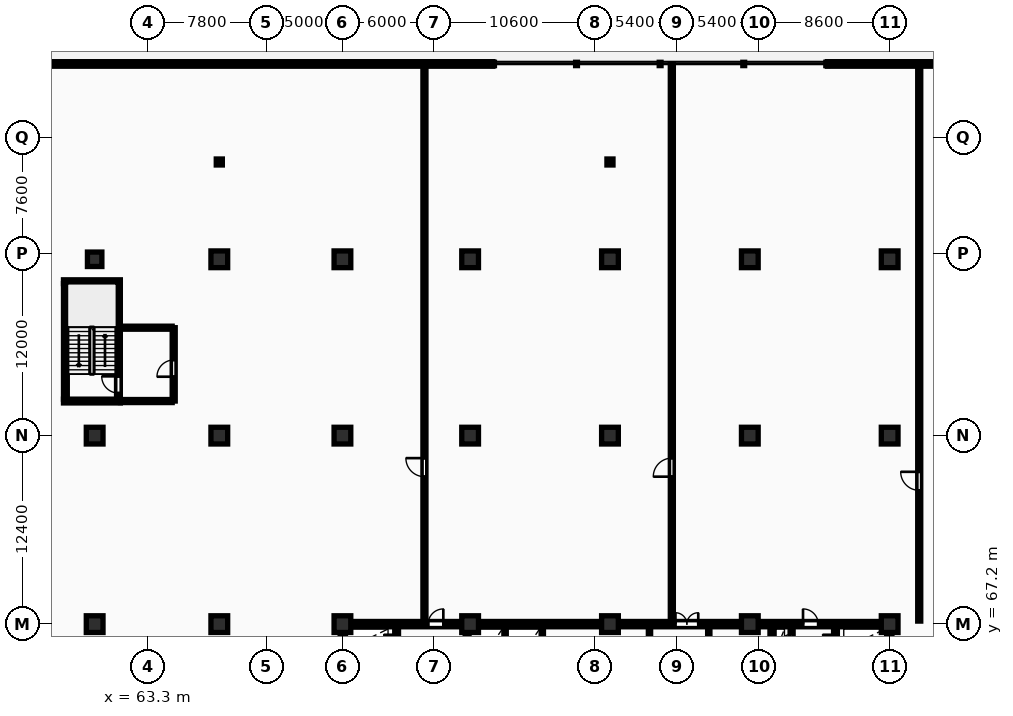
"""IFC4 building model, lengths in metres.
Left out: names, types, materials, properties, quantities, classifications, styles, units other than length and angle.
Written with IfcOpenShell. Run it as: python <this file> out.ifc"""

import sys

from ifc_helpers import new_model, si_unit, direction, frame, frame_2d, origin, origin_2d, place, context, subcontext, project, spatial, rectangle, circle, i_section, extrude, element, fill, save


model = new_model("IFC4")
c1 = context("Model", 3, precision=1e-05, world=origin(), true_north=direction((0.0, 1.0)))
c2 = subcontext(c1, "Body", "Model", "MODEL_VIEW")
j1 = project(units=[si_unit("LENGTHUNIT", "METRE"), si_unit("PLANEANGLEUNIT", "RADIAN")], contexts=[c1])
p1 = place(None, origin())
s1 = spatial("IfcSite", under=j1, at=p1, CompositionType="ELEMENT")
p2 = place(p1, origin())
s2 = spatial("IfcBuilding", under=s1, at=p2, CompositionType="ELEMENT")
p3 = place(p2, frame((0.0, 0.0, 10.0)))
s3 = spatial("IfcBuildingStorey", under=s2, at=p3, CompositionType="ELEMENT", Elevation=10.0)
for number, where, z_axis, x_axis in (
    (1, (59.8, 67.2, 0.0), (0.0, 0.0, 1.0), (1.0, 0.0, 0.0)),
    (2, (59.8, 79.6, 0.0), (0.0, 0.0, 1.0), (1.0, 0.0, 0.0)),
):
    element("IfcColumn", number, at=place(p3, frame(where, z_axis=z_axis, x_axis=x_axis)), inside=s3, PredefinedType="COLUMN", context=c2, shape_type="SweptSolid", body=[
        extrude(rectangle(XDim=1.1, YDim=1.1, at=origin_2d()), origin(), (0.0, 0.0, 1.0), 4.5),
    ])
p4 = place(p3, frame((59.8, 91.2, 0.0), z_axis=(0.0, 0.0, 1.0), x_axis=(1.0, 0.0, 0.0)))
e3 = element("IfcColumn", 3, at=p4, inside=s3, PredefinedType="COLUMN", context=c2, shape_type="SweptSolid", body=[
    extrude(circle(Radius=0.475, at=origin_2d()), origin(), (0.0, 0.0, 1.0), 4.5),
])
for number, where, z_axis, x_axis in (
    (4, (68.0, 67.2, 0.0), (0.0, 0.0, 1.0), (1.0, 0.0, 0.0)),
    (5, (68.0, 79.6, 0.0), (0.0, 0.0, 1.0), (1.0, 0.0, 0.0)),
    (6, (68.0, 91.2, 0.0), (0.0, 0.0, 1.0), (1.0, 0.0, 0.0)),
    (7, (76.1, 67.2, 0.0), (0.0, 0.0, 1.0), (1.0, 0.0, 0.0)),
    (8, (76.1, 79.6, 0.0), (0.0, 0.0, 1.0), (1.0, 0.0, 0.0)),
    (9, (76.1, 91.2, 0.0), (0.0, 0.0, 1.0), (1.0, 0.0, 0.0)),
    (10, (84.5, 67.2, 0.0), (0.0, 0.0, 1.0), (1.0, 0.0, 0.0)),
    (11, (84.5, 79.6, 0.0), (0.0, 0.0, 1.0), (1.0, 0.0, 0.0)),
    (12, (84.5, 91.2, 0.0), (0.0, 0.0, 1.0), (1.0, 0.0, 0.0)),
    (13, (93.7, 67.2, 0.0), (0.0, 0.0, 1.0), (1.0, 0.0, 0.0)),
    (14, (93.7, 79.6, 0.0), (0.0, 0.0, 1.0), (1.0, 0.0, 0.0)),
    (15, (93.7, 91.2, 0.0), (0.0, 0.0, 1.0), (1.0, 0.0, 0.0)),
    (16, (102.9, 67.2, 0.0), (0.0, 0.0, 1.0), (1.0, 0.0, 0.0)),
    (17, (102.9, 79.6, 0.0), (0.0, 0.0, 1.0), (1.0, 0.0, 0.0)),
    (18, (102.9, 91.2, 0.0), (0.0, 0.0, 1.0), (1.0, 0.0, 0.0)),
    (19, (112.1, 67.2, 0.0), (0.0, 0.0, 1.0), (1.0, 0.0, 0.0)),
    (20, (112.1, 79.6, 0.0), (0.0, 0.0, 1.0), (1.0, 0.0, 0.0)),
    (21, (112.1, 91.2, 0.0), (0.0, 0.0, 1.0), (1.0, 0.0, 0.0)),
):
    element("IfcColumn", number, at=place(p3, frame(where, z_axis=z_axis, x_axis=x_axis)), inside=s3, PredefinedType="COLUMN", context=c2, shape_type="SweptSolid", body=[
        extrude(rectangle(XDim=1.1, YDim=1.1, at=origin_2d()), origin(), (0.0, 0.0, 1.0), 4.5),
    ])
for number, where, z_axis, x_axis in (
    (22, (68.0, 97.6, 0.0), (0.0, 0.0, 1.0), (1.0, 0.0, 0.0)),
    (23, (93.7, 97.6, 0.0), (0.0, 0.0, 1.0), (1.0, 0.0, 0.0)),
):
    element("IfcColumn", number, at=place(p3, frame(where, z_axis=z_axis, x_axis=x_axis)), inside=s3, PredefinedType="COLUMN", context=c2, shape_type="SweptSolid", body=[
        extrude(i_section(OverallWidth=0.399, OverallDepth=0.394, WebThickness=0.023, FlangeThickness=0.037, FilletRadius=0.015, at=origin_2d()), origin(), (0.0, 0.0, 1.0), 4.5),
    ])
p5 = place(p3, frame((146.8, 104.05, 0.0), z_axis=(0.0, 0.0, 1.0), x_axis=(-1.0, 0.0, 0.0)))
e24 = element("IfcWall", 24, at=p5, inside=s3, PredefinedType="STANDARD", context=c2, shape_type="SweptSolid", body=[
    extrude(rectangle(XDim=38.8, YDim=0.3, at=frame_2d((19.4, 0.0))), origin(), (0.0, 0.0, 1.0), 4.2),
])
p6 = place(p5, frame((10.0, 0.0, 0.0)))
e25 = element("IfcOpeningElement", 25, at=p6, cuts=e24, PredefinedType="OPENING", context=c2, shape_type="SweptSolid", body=[
    extrude(rectangle(XDim=1.6, YDim=2.2, at=frame_2d((0.8, 1.1))), frame((0.0, 0.16, 0.0), z_axis=(0.0, -1.0, 0.0), x_axis=(1.0, 0.0, 0.0)), (0.0, 0.0, 1.0), 0.32),
])
p7 = place(p3, frame((86.0, 104.05, 0.0), z_axis=(0.0, 0.0, 1.0), x_axis=(-1.0, 0.0, 0.0)))
e26 = element("IfcWall", 26, at=p7, inside=s3, PredefinedType="STANDARD", context=c2, shape_type="SweptSolid", body=[
    extrude(rectangle(XDim=36.8, YDim=0.3, at=frame_2d((18.4, 0.0))), origin(), (0.0, 0.0, 1.0), 4.2),
])
for number, where, z_axis, x_axis in (
    (27, (76.125, 55.375, 0.0), (0.0, 0.0, 1.0), (0.0, 1.0, 0.0)),
    (28, (112.075, 55.375, 0.0), (0.0, 0.0, 1.0), (0.0, 1.0, 0.0)),
):
    element("IfcWall", number, at=place(p3, frame(where, z_axis=z_axis, x_axis=x_axis)), inside=s3, PredefinedType="SHEAR", context=c2, shape_type="SweptSolid", body=[
        extrude(rectangle(XDim=11.65, YDim=0.35, at=frame_2d((5.825, 0.0))), origin(), (0.0, 0.0, 1.0), 4.5),
    ])
p8 = place(p3, frame((75.95, 67.2, 0.0), z_axis=(0.0, 0.0, 1.0), x_axis=(1.0, 0.0, 0.0)))
e29 = element("IfcWall", 29, at=p8, inside=s3, PredefinedType="SHEAR", context=c2, shape_type="SweptSolid", body=[
    extrude(rectangle(XDim=36.3, YDim=0.35, at=frame_2d((18.15, 0.0))), origin(), (0.0, 0.0, 1.0), 4.5),
])
p9 = place(p8, frame((5.788, 0.0, 0.0)))
e30 = element("IfcOpeningElement", 30, at=p9, cuts=e29, PredefinedType="OPENING", context=c2, shape_type="SweptSolid", body=[
    extrude(rectangle(XDim=1.0, YDim=2.15, at=frame_2d((0.5, 1.075))), frame((0.0, 0.185, 0.0), z_axis=(0.0, -1.0, 0.0), x_axis=(1.0, 0.0, 0.0)), (0.0, 0.0, 1.0), 0.37),
])
p10 = place(p8, frame((22.058, 0.0, 0.0)))
e31 = element("IfcOpeningElement", 31, at=p10, cuts=e29, PredefinedType="OPENING", context=c2, shape_type="SweptSolid", body=[
    extrude(rectangle(XDim=1.5, YDim=2.2, at=frame_2d((0.75, 1.1))), frame((0.0, 0.185, 0.0), z_axis=(0.0, -1.0, 0.0), x_axis=(1.0, 0.0, 0.0)), (0.0, 0.0, 1.0), 0.37),
])
p11 = place(p8, frame((30.45, 0.0, 0.0)))
e32 = element("IfcOpeningElement", 32, at=p11, cuts=e29, PredefinedType="OPENING", context=c2, shape_type="SweptSolid", body=[
    extrude(rectangle(XDim=1.0, YDim=2.15, at=frame_2d((0.5, 1.075))), frame((0.0, 0.185, 0.0), z_axis=(0.0, -1.0, 0.0), x_axis=(1.0, 0.0, 0.0)), (0.0, 0.0, 1.0), 0.37),
])
p12 = place(p3, frame((79.665, 55.4, 0.0), z_axis=(0.0, 0.0, 1.0), x_axis=(0.0, 1.0, 0.0)))
e33 = element("IfcWall", 33, at=p12, inside=s3, PredefinedType="SHEAR", context=c2, shape_type="SweptSolid", body=[
    extrude(rectangle(XDim=11.6, YDim=0.25, at=frame_2d((5.8, 0.0))), origin(), (0.0, 0.0, 1.0), 4.5),
])
p13 = place(p12, frame((0.55, 0.0, 0.0)))
e34 = element("IfcOpeningElement", 34, at=p13, cuts=e33, PredefinedType="OPENING", context=c2, shape_type="SweptSolid", body=[
    extrude(rectangle(XDim=0.85, YDim=2.05, at=frame_2d((0.425, 1.025))), frame((0.0, 0.135, 0.0), z_axis=(0.0, -1.0, 0.0), x_axis=(1.0, 0.0, 0.0)), (0.0, 0.0, 1.0), 0.27),
])
p14 = place(p12, frame((8.4, 0.0, 0.0)))
e35 = element("IfcOpeningElement", 35, at=p14, cuts=e33, PredefinedType="OPENING", context=c2, shape_type="SweptSolid", body=[
    extrude(rectangle(XDim=1.1, YDim=2.1, at=frame_2d((0.55, 1.05))), frame((0.0, 0.135, 0.0), z_axis=(0.0, -1.0, 0.0), x_axis=(1.0, 0.0, 0.0)), (0.0, 0.0, 1.0), 0.27),
])
p15 = place(p12, frame((10.25, 0.0, 0.0)))
e36 = element("IfcOpeningElement", 36, at=p15, cuts=e33, PredefinedType="OPENING", context=c2, shape_type="SweptSolid", body=[
    extrude(rectangle(XDim=0.85, YDim=2.05, at=frame_2d((0.425, 1.025))), frame((0.0, 0.135, 0.0), z_axis=(0.0, -1.0, 0.0), x_axis=(1.0, 0.0, 0.0)), (0.0, 0.0, 1.0), 0.27),
])
p16 = place(p3, frame((84.3, 55.4, 0.0), z_axis=(0.0, 0.0, 1.0), x_axis=(0.0, 1.0, 0.0)))
e37 = element("IfcWall", 37, at=p16, inside=s3, PredefinedType="SHEAR", context=c2, shape_type="SweptSolid", body=[
    extrude(rectangle(XDim=11.6, YDim=0.25, at=frame_2d((5.8, 0.0))), origin(), (0.0, 0.0, 1.0), 4.5),
])
p17 = place(p16, frame((5.2, 0.0, 0.0)))
e38 = element("IfcOpeningElement", 38, at=p17, cuts=e37, PredefinedType="OPENING", context=c2, shape_type="SweptSolid", body=[
    extrude(rectangle(XDim=1.1, YDim=2.1, at=frame_2d((0.55, 1.05))), frame((0.0, 0.135, 0.0), z_axis=(0.0, -1.0, 0.0), x_axis=(1.0, 0.0, 0.0)), (0.0, 0.0, 1.0), 0.27),
])
for number, where, z_axis, x_axis in (
    (39, (86.8, 63.4, 0.0), (0.0, 0.0, 1.0), (0.0, 1.0, 0.0)),
    (40, (89.25, 63.4, 0.0), (0.0, 0.0, 1.0), (0.0, 1.0, 0.0)),
    (41, (96.3, 63.4, 0.0), (0.0, 0.0, 1.0), (0.0, 1.0, 0.0)),
    (42, (100.2, 63.4, 0.0), (0.0, 0.0, 1.0), (0.0, 1.0, 0.0)),
):
    element("IfcWall", number, at=place(p3, frame(where, z_axis=z_axis, x_axis=x_axis)), inside=s3, PredefinedType="PARTITIONING", context=c2, shape_type="SweptSolid", body=[
        extrude(rectangle(XDim=3.6, YDim=0.15, at=frame_2d((1.8, 0.0))), origin(), (0.0, 0.0, 1.0), 4.2),
    ])
p18 = place(p3, frame((105.65, 65.28, 0.0), z_axis=(0.0, 0.0, 1.0), x_axis=(0.0, 1.0, 0.0)))
e43 = element("IfcWall", 43, at=p18, inside=s3, PredefinedType="PARTITIONING", context=c2, shape_type="SweptSolid", body=[
    extrude(rectangle(XDim=1.72, YDim=0.2, at=frame_2d((0.86, 0.0))), origin(), (0.0, 0.0, 1.0), 4.2),
])
p19 = place(p18, frame((0.4, 0.0, 0.0)))
e44 = element("IfcOpeningElement", 44, at=p19, cuts=e43, PredefinedType="OPENING", context=c2, shape_type="SweptSolid", body=[
    extrude(rectangle(XDim=0.85, YDim=2.05, at=frame_2d((0.425, 1.025))), frame((0.0, 0.11, 0.0), z_axis=(0.0, -1.0, 0.0), x_axis=(1.0, 0.0, 0.0)), (0.0, 0.0, 1.0), 0.22),
])
p20 = place(p3, frame((104.35, 58.4, 0.0), z_axis=(0.0, 0.0, 1.0), x_axis=(0.0, 1.0, 0.0)))
e45 = element("IfcWall", 45, at=p20, inside=s3, PredefinedType="SHEAR", context=c2, shape_type="SweptSolid", body=[
    extrude(rectangle(XDim=8.6, YDim=0.25, at=frame_2d((4.3, 0.0))), origin(), (0.0, 0.0, 1.0), 4.5),
])
p21 = place(p20, frame((1.8, 0.0, 0.0)))
e46 = element("IfcOpeningElement", 46, at=p21, cuts=e45, PredefinedType="OPENING", context=c2, shape_type="SweptSolid", body=[
    extrude(rectangle(XDim=1.1, YDim=2.1, at=frame_2d((0.55, 1.05))), frame((0.0, 0.135, 0.0), z_axis=(0.0, -1.0, 0.0), x_axis=(1.0, 0.0, 0.0)), (0.0, 0.0, 1.0), 0.27),
])
p22 = place(p3, frame((108.535, 55.4, 0.0), z_axis=(0.0, 0.0, 1.0), x_axis=(0.0, 1.0, 0.0)))
e47 = element("IfcWall", 47, at=p22, inside=s3, PredefinedType="SHEAR", context=c2, shape_type="SweptSolid", body=[
    extrude(rectangle(XDim=11.6, YDim=0.25, at=frame_2d((5.8, 0.0))), origin(), (0.0, 0.0, 1.0), 4.5),
])
p23 = place(p22, frame((8.2, 0.0, 0.0)))
e48 = element("IfcOpeningElement", 48, at=p23, cuts=e47, PredefinedType="OPENING", context=c2, shape_type="SweptSolid", body=[
    extrude(rectangle(XDim=1.1, YDim=2.1, at=frame_2d((0.55, 1.05))), frame((0.0, 0.135, 0.0), z_axis=(0.0, -1.0, 0.0), x_axis=(1.0, 0.0, 0.0)), (0.0, 0.0, 1.0), 0.27),
])
p24 = place(p22, frame((10.25, 0.0, 0.0)))
e49 = element("IfcOpeningElement", 49, at=p24, cuts=e47, PredefinedType="OPENING", context=c2, shape_type="SweptSolid", body=[
    extrude(rectangle(XDim=0.85, YDim=2.05, at=frame_2d((0.425, 1.025))), frame((0.0, 0.135, 0.0), z_axis=(0.0, -1.0, 0.0), x_axis=(1.0, 0.0, 0.0)), (0.0, 0.0, 1.0), 0.27),
])
p25 = place(p3, frame((57.875, 82.0, 0.0), z_axis=(0.0, 0.0, 1.0), x_axis=(0.0, 1.0, 0.0)))
e50 = element("IfcWall", 50, at=p25, inside=s3, PredefinedType="SHEAR", context=c2, shape_type="SweptSolid", body=[
    extrude(rectangle(XDim=7.6, YDim=0.25, at=frame_2d((3.8, 0.0))), origin(), (0.0, 0.0, 1.0), 4.5),
])
for number, where, z_axis, x_axis in (
    (51, (57.75, 81.875, 0.0), (0.0, 0.0, 1.0), (1.0, 0.0, 0.0)),
    (52, (57.75, 89.725, 0.0), (0.0, 0.0, 1.0), (1.0, 0.0, 0.0)),
):
    element("IfcWall", number, at=place(p3, frame(where, z_axis=z_axis, x_axis=x_axis)), inside=s3, PredefinedType="SHEAR", context=c2, shape_type="SweptSolid", body=[
        extrude(rectangle(XDim=3.74, YDim=0.25, at=frame_2d((1.87, 0.0))), origin(), (0.0, 0.0, 1.0), 4.5),
    ])
p26 = place(p3, frame((61.365, 82.0, 0.0), z_axis=(0.0, 0.0, 1.0), x_axis=(0.0, 1.0, 0.0)))
e53 = element("IfcWall", 53, at=p26, inside=s3, PredefinedType="SHEAR", context=c2, shape_type="SweptSolid", body=[
    extrude(rectangle(XDim=7.6, YDim=0.25, at=frame_2d((3.8, 0.0))), origin(), (0.0, 0.0, 1.0), 4.5),
])
p27 = place(p26, frame((0.4, 0.0, 0.0)))
e54 = element("IfcOpeningElement", 54, at=p27, cuts=e53, PredefinedType="OPENING", context=c2, shape_type="SweptSolid", body=[
    extrude(rectangle(XDim=1.1, YDim=2.1, at=frame_2d((0.55, 1.05))), frame((0.0, 0.135, 0.0), z_axis=(0.0, -1.0, 0.0), x_axis=(1.0, 0.0, 0.0)), (0.0, 0.0, 1.0), 0.27),
])
p28 = place(p3, frame((65.0, 81.875, 0.0), z_axis=(0.0, 0.0, 1.0), x_axis=(0.0, 1.0, 0.0)))
e55 = element("IfcWall", 55, at=p28, inside=s3, PredefinedType="PARTITIONING", context=c2, shape_type="SweptSolid", body=[
    extrude(rectangle(XDim=4.825, YDim=0.2, at=frame_2d((2.413, 0.0))), origin(), (0.0, 0.0, 1.0), 4.2),
])
p29 = place(p28, frame((1.6, 0.0, 0.0)))
e56 = element("IfcOpeningElement", 56, at=p29, cuts=e55, PredefinedType="OPENING", context=c2, shape_type="SweptSolid", body=[
    extrude(rectangle(XDim=1.1, YDim=2.15, at=frame_2d((0.55, 1.075))), frame((0.0, 0.11, 0.0), z_axis=(0.0, -1.0, 0.0), x_axis=(1.0, 0.0, 0.0)), (0.0, 0.0, 1.0), 0.22),
])
for number, where, z_axis, x_axis in (
    (57, (61.5, 81.875, 0.0), (0.0, 0.0, 1.0), (1.0, 0.0, 0.0)),
    (58, (61.5, 86.7, 0.0), (0.0, 0.0, 1.0), (1.0, 0.0, 0.0)),
):
    element("IfcWall", number, at=place(p3, frame(where, z_axis=z_axis, x_axis=x_axis)), inside=s3, PredefinedType="PARTITIONING", context=c2, shape_type="SweptSolid", body=[
        extrude(rectangle(XDim=3.4, YDim=0.2, at=frame_2d((1.7, 0.0))), origin(), (0.0, 0.0, 1.0), 4.2),
    ])
p30 = place(p3, frame((81.495, 67.4, 0.0), z_axis=(0.0, 0.0, 1.0), x_axis=(0.0, 1.0, 0.0)))
e59 = element("IfcWall", 59, at=p30, inside=s3, PredefinedType="PARTITIONING", context=c2, shape_type="SweptSolid", body=[
    extrude(rectangle(XDim=36.62, YDim=0.2, at=frame_2d((18.31, 0.0))), origin(), (0.0, 0.0, 1.0), 4.2),
])
p31 = place(p30, frame((9.5, 0.0, 0.0)))
e60 = element("IfcOpeningElement", 60, at=p31, cuts=e59, PredefinedType="OPENING", context=c2, shape_type="SweptSolid", body=[
    extrude(rectangle(XDim=1.22, YDim=2.18, at=frame_2d((0.61, 1.09))), frame((0.0, 0.11, 0.0), z_axis=(0.0, -1.0, 0.0), x_axis=(1.0, 0.0, 0.0)), (0.0, 0.0, 1.0), 0.22),
])
p32 = place(p3, frame((97.77, 67.4, 0.0), z_axis=(0.0, 0.0, 1.0), x_axis=(0.0, 1.0, 0.0)))
e61 = element("IfcWall", 61, at=p32, inside=s3, PredefinedType="PARTITIONING", context=c2, shape_type="SweptSolid", body=[
    extrude(rectangle(XDim=36.62, YDim=0.2, at=frame_2d((18.31, 0.0))), origin(), (0.0, 0.0, 1.0), 4.2),
])
p33 = place(p32, frame((9.5, 0.0, 0.0)))
e62 = element("IfcOpeningElement", 62, at=p33, cuts=e61, PredefinedType="OPENING", context=c2, shape_type="SweptSolid", body=[
    extrude(rectangle(XDim=1.22, YDim=2.18, at=frame_2d((0.61, 1.09))), frame((0.0, 0.11, 0.0), z_axis=(0.0, -1.0, 0.0), x_axis=(1.0, 0.0, 0.0)), (0.0, 0.0, 1.0), 0.22),
])
p34 = place(p3, frame((114.045, 67.4, 0.0), z_axis=(0.0, 0.0, 1.0), x_axis=(0.0, 1.0, 0.0)))
e63 = element("IfcWall", 63, at=p34, inside=s3, PredefinedType="PARTITIONING", context=c2, shape_type="SweptSolid", body=[
    extrude(rectangle(XDim=36.62, YDim=0.2, at=frame_2d((18.31, 0.0))), origin(), (0.0, 0.0, 1.0), 4.2),
])
p35 = place(p34, frame((8.6, 0.0, 0.0)))
e64 = element("IfcOpeningElement", 64, at=p35, cuts=e63, PredefinedType="OPENING", context=c2, shape_type="SweptSolid", body=[
    extrude(rectangle(XDim=1.22, YDim=2.18, at=frame_2d((0.61, 1.09))), frame((0.0, 0.11, 0.0), z_axis=(0.0, -1.0, 0.0), x_axis=(1.0, 0.0, 0.0)), (0.0, 0.0, 1.0), 0.22),
])
p36 = place(p9, origin())
e65 = element("IfcDoor", 65, at=p36, inside=s3, OperationType="SINGLE_SWING_RIGHT", PredefinedType="DOOR", context=c2, shape_type="SweptSolid", body=[
    extrude(rectangle(XDim=1.0, YDim=2.15, at=frame_2d((0.5, 1.075))), frame((0.0, 0.025, 0.0), z_axis=(0.0, -1.0, 0.0), x_axis=(1.0, 0.0, 0.0)), (0.0, 0.0, 1.0), 0.05),
])
fill(e30, e65)
p37 = place(p10, origin())
e66 = element("IfcDoor", 66, at=p37, inside=s3, OperationType="DOUBLE_DOOR_SINGLE_SWING", PredefinedType="DOOR", context=c2, shape_type="SweptSolid", body=[
    extrude(rectangle(XDim=1.5, YDim=2.2, at=frame_2d((0.75, 1.1))), frame((0.0, 0.025, 0.0), z_axis=(0.0, -1.0, 0.0), x_axis=(1.0, 0.0, 0.0)), (0.0, 0.0, 1.0), 0.05),
])
fill(e31, e66)
p38 = place(p11, origin())
e67 = element("IfcDoor", 67, at=p38, inside=s3, OperationType="SINGLE_SWING_LEFT", PredefinedType="DOOR", context=c2, shape_type="SweptSolid", body=[
    extrude(rectangle(XDim=1.0, YDim=2.15, at=frame_2d((0.5, 1.075))), frame((0.0, 0.025, 0.0), z_axis=(0.0, -1.0, 0.0), x_axis=(1.0, 0.0, 0.0)), (0.0, 0.0, 1.0), 0.05),
])
fill(e32, e67)
p39 = place(p15, origin())
e68 = element("IfcDoor", 68, at=p39, inside=s3, OperationType="SINGLE_SWING_RIGHT", PredefinedType="DOOR", context=c2, shape_type="SweptSolid", body=[
    extrude(rectangle(XDim=0.85, YDim=2.05, at=frame_2d((0.425, 1.025))), frame((0.0, 0.025, 0.0), z_axis=(0.0, -1.0, 0.0), x_axis=(1.0, 0.0, 0.0)), (0.0, 0.0, 1.0), 0.05),
])
fill(e36, e68)
p40 = place(p19, origin())
e69 = element("IfcDoor", 69, at=p40, inside=s3, OperationType="SINGLE_SWING_LEFT", PredefinedType="DOOR", context=c2, shape_type="SweptSolid", body=[
    extrude(rectangle(XDim=0.85, YDim=2.05, at=frame_2d((0.425, 1.025))), frame((0.0, 0.025, 0.0), z_axis=(0.0, -1.0, 0.0), x_axis=(1.0, 0.0, 0.0)), (0.0, 0.0, 1.0), 0.05),
])
fill(e44, e69)
p41 = place(p24, origin())
e70 = element("IfcDoor", 70, at=p41, inside=s3, OperationType="SINGLE_SWING_RIGHT", PredefinedType="DOOR", context=c2, shape_type="SweptSolid", body=[
    extrude(rectangle(XDim=0.85, YDim=2.05, at=frame_2d((0.425, 1.025))), frame((0.0, 0.025, 0.0), z_axis=(0.0, -1.0, 0.0), x_axis=(1.0, 0.0, 0.0)), (0.0, 0.0, 1.0), 0.05),
])
fill(e49, e70)
p42 = place(p27, origin())
e71 = element("IfcDoor", 71, at=p42, inside=s3, OperationType="SINGLE_SWING_RIGHT", PredefinedType="DOOR", context=c2, shape_type="SweptSolid", body=[
    extrude(rectangle(XDim=1.1, YDim=2.1, at=frame_2d((0.55, 1.05))), frame((0.0, 0.025, 0.0), z_axis=(0.0, -1.0, 0.0), x_axis=(1.0, 0.0, 0.0)), (0.0, 0.0, 1.0), 0.05),
])
fill(e54, e71)
p43 = place(p29, origin())
e72 = element("IfcDoor", 72, at=p43, inside=s3, OperationType="SINGLE_SWING_LEFT", PredefinedType="DOOR", context=c2, shape_type="SweptSolid", body=[
    extrude(rectangle(XDim=1.1, YDim=2.15, at=frame_2d((0.55, 1.075))), frame((0.0, 0.025, 0.0), z_axis=(0.0, -1.0, 0.0), x_axis=(1.0, 0.0, 0.0)), (0.0, 0.0, 1.0), 0.05),
])
fill(e56, e72)
p44 = place(p31, origin())
e73 = element("IfcDoor", 73, at=p44, inside=s3, OperationType="SINGLE_SWING_RIGHT", PredefinedType="DOOR", context=c2, shape_type="SweptSolid", body=[
    extrude(rectangle(XDim=1.22, YDim=2.18, at=frame_2d((0.61, 1.09))), frame((0.0, 0.025, 0.0), z_axis=(0.0, -1.0, 0.0), x_axis=(1.0, 0.0, 0.0)), (0.0, 0.0, 1.0), 0.05),
])
fill(e60, e73)
p45 = place(p33, origin())
e74 = element("IfcDoor", 74, at=p45, inside=s3, OperationType="SINGLE_SWING_LEFT", PredefinedType="DOOR", context=c2, shape_type="SweptSolid", body=[
    extrude(rectangle(XDim=1.22, YDim=2.18, at=frame_2d((0.61, 1.09))), frame((0.0, 0.025, 0.0), z_axis=(0.0, -1.0, 0.0), x_axis=(1.0, 0.0, 0.0)), (0.0, 0.0, 1.0), 0.05),
])
fill(e62, e74)
p46 = place(p35, origin())
e75 = element("IfcDoor", 75, at=p46, inside=s3, OperationType="SINGLE_SWING_RIGHT", PredefinedType="DOOR", context=c2, shape_type="SweptSolid", body=[
    extrude(rectangle(XDim=1.22, YDim=2.18, at=frame_2d((0.61, 1.09))), frame((0.0, 0.025, 0.0), z_axis=(0.0, -1.0, 0.0), x_axis=(1.0, 0.0, 0.0)), (0.0, 0.0, 1.0), 0.05),
])
fill(e64, e75)
save(model, sys.argv[1])
